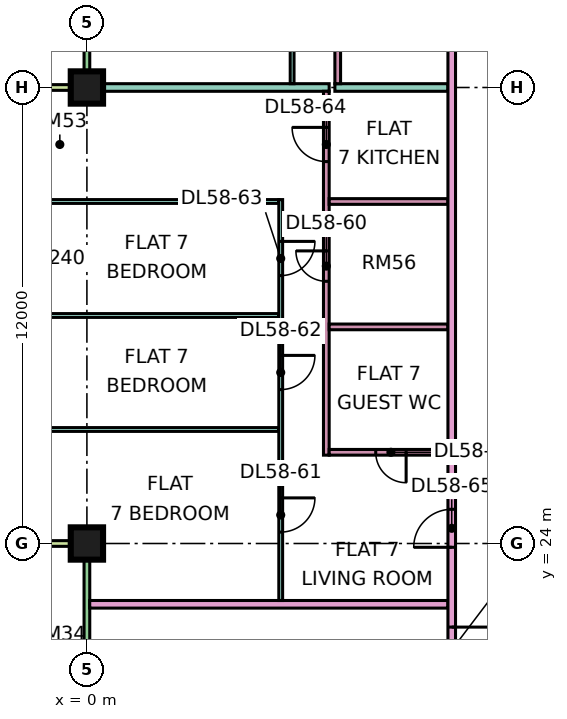
"""IFC4 building model, lengths in metres.
Left out: names, types, materials, properties, quantities, classifications, styles, units other than length and angle.
Written with IfcOpenShell. Run it as: python <this file> out.ifc"""

import sys

from ifc_helpers import new_model, si_unit, direction, frame, frame_2d, origin, origin_2d, place, context, subcontext, project, spatial, rectangle, extrude, element, fill, save


model = new_model("IFC4")
c1 = context("Model", 3, precision=1e-05, world=origin(), true_north=direction((0.0, 1.0)))
c2 = subcontext(c1, "Body", "Model", "MODEL_VIEW")
j1 = project(units=[si_unit("LENGTHUNIT", "METRE"), si_unit("PLANEANGLEUNIT", "RADIAN")], contexts=[c1])
p1 = place(None, origin())
s1 = spatial("IfcSite", under=j1, at=p1, CompositionType="ELEMENT")
p2 = place(p1, origin())
s2 = spatial("IfcBuilding", under=s1, at=p2, CompositionType="ELEMENT")
p3 = place(p2, frame((0.0, 0.0, 245.4)))
s3 = spatial("IfcBuildingStorey", under=s2, at=p3, CompositionType="ELEMENT", Elevation=245.4)
p4 = place(p3, frame((0.0, 24.0, 0.0), z_axis=(0.0, 0.0, 1.0), x_axis=(1.0, 0.0, 0.0)))
e1 = element("IfcColumn", 1, at=p4, inside=s3, PredefinedType="COLUMN", context=c2, shape_type="SweptSolid", body=[
    extrude(rectangle(XDim=0.85, YDim=0.85, at=origin_2d()), origin(), (0.0, 0.0, 1.0), 3.75),
])
p5 = place(p3, frame((0.0, 36.0, 0.0), z_axis=(0.0, 0.0, 1.0), x_axis=(1.0, 0.0, 0.0)))
e2 = element("IfcColumn", 2, at=p5, inside=s3, PredefinedType="COLUMN", context=c2, shape_type="SweptSolid", body=[
    extrude(rectangle(XDim=0.85, YDim=0.85, at=origin_2d()), origin(), (0.0, 0.0, 1.0), 3.75),
])
p6 = place(p3, frame((0.0, 47.925, 0.0), z_axis=(0.0, 0.0, 1.0), x_axis=(0.0, -1.0, 0.0)))
e3 = element("IfcWall", 3, at=p6, inside=s3, PredefinedType="SOLIDWALL", context=c2, shape_type="SweptSolid", body=[
    extrude(rectangle(XDim=11.85, YDim=0.15, at=frame_2d((5.925, 0.0))), origin(), (0.0, 0.0, 1.0), 3.35),
])
p7 = place(p6, frame((0.6, 0.0, 0.45)))
e4 = element("IfcOpeningElement", 4, at=p7, cuts=e3, PredefinedType="OPENING", context=c2, shape_type="SweptSolid", body=[
    extrude(rectangle(XDim=1.2, YDim=2.4, at=frame_2d((0.6, 1.2))), frame((0.0, 0.085, 0.0), z_axis=(0.0, -1.0, 0.0), x_axis=(1.0, 0.0, 0.0)), (0.0, 0.0, 1.0), 0.17),
])
p8 = place(p6, frame((4.087, 0.0, 0.0)))
e5 = element("IfcOpeningElement", 5, at=p8, cuts=e3, PredefinedType="OPENING", context=c2, shape_type="SweptSolid", body=[
    extrude(rectangle(XDim=1.2, YDim=2.4, at=frame_2d((0.6, 1.2))), frame((0.0, 0.085, 0.0), z_axis=(0.0, -1.0, 0.0), x_axis=(1.0, 0.0, 0.0)), (0.0, 0.0, 1.0), 0.17),
])
p9 = place(p6, frame((6.525, 0.0, 0.45)))
e6 = element("IfcOpeningElement", 6, at=p9, cuts=e3, PredefinedType="OPENING", context=c2, shape_type="SweptSolid", body=[
    extrude(rectangle(XDim=1.8, YDim=2.4, at=frame_2d((0.9, 1.2))), frame((0.0, 0.085, 0.0), z_axis=(0.0, -1.0, 0.0), x_axis=(1.0, 0.0, 0.0)), (0.0, 0.0, 1.0), 0.17),
])
p10 = place(p6, frame((9.562, 0.0, 0.45)))
e7 = element("IfcOpeningElement", 7, at=p10, cuts=e3, PredefinedType="OPENING", context=c2, shape_type="SweptSolid", body=[
    extrude(rectangle(XDim=1.2, YDim=2.4, at=frame_2d((0.6, 1.2))), frame((0.0, 0.085, 0.0), z_axis=(0.0, -1.0, 0.0), x_axis=(1.0, 0.0, 0.0)), (0.0, 0.0, 1.0), 0.17),
])
p11 = place(p3, frame((-1.5, 36.0, 0.0), z_axis=(0.0, 0.0, 1.0), x_axis=(1.0, 0.0, 0.0)))
e8 = element("IfcWall", 8, at=p11, inside=s3, PredefinedType="SOLIDWALL", context=c2, shape_type="SweptSolid", body=[
    extrude(rectangle(XDim=1.5, YDim=0.15, at=frame_2d((0.75, 0.0))), origin(), (0.0, 0.0, 1.0), 3.35),
])
p12 = place(p3, frame((0.0, 23.925, 0.0), z_axis=(0.0, 0.0, 1.0), x_axis=(0.0, -1.0, 0.0)))
e9 = element("IfcWall", 9, at=p12, inside=s3, PredefinedType="SOLIDWALL", context=c2, shape_type="SweptSolid", body=[
    extrude(rectangle(XDim=11.35, YDim=0.15, at=frame_2d((5.675, 0.0))), origin(), (0.0, 0.0, 1.0), 3.35),
])
p13 = place(p12, frame((6.738, 0.0, 0.0)))
e10 = element("IfcOpeningElement", 10, at=p13, cuts=e9, PredefinedType="OPENING", context=c2, shape_type="SweptSolid", body=[
    extrude(rectangle(XDim=1.8, YDim=2.4, at=frame_2d((0.9, 1.2))), frame((0.0, 0.085, 0.0), z_axis=(0.0, -1.0, 0.0), x_axis=(1.0, 0.0, 0.0)), (0.0, 0.0, 1.0), 0.17),
])
p14 = place(p3, frame((-1.5, 24.0, 0.0), z_axis=(0.0, 0.0, 1.0), x_axis=(1.0, 0.0, 0.0)))
e11 = element("IfcWall", 11, at=p14, inside=s3, PredefinedType="SOLIDWALL", context=c2, shape_type="SweptSolid", body=[
    extrude(rectangle(XDim=1.5, YDim=0.15, at=frame_2d((0.75, 0.0))), origin(), (0.0, 0.0, 1.0), 3.35),
])
for number, where, z_axis, x_axis in (
    (12, (-1.351, 27.0, 0.0), (0.0, 0.0, 1.0), (1.0, 0.0, 0.0)),
    (13, (-1.351, 30.0, 0.0), (0.0, 0.0, 1.0), (1.0, 0.0, 0.0)),
):
    element("IfcWall", number, at=place(p3, frame(where, z_axis=z_axis, x_axis=x_axis)), inside=s3, PredefinedType="PARTITIONING", context=c2, shape_type="SweptSolid", body=[
        extrude(rectangle(XDim=6.401, YDim=0.1, at=frame_2d((3.201, 0.0))), origin(), (0.0, 0.0, 1.0), 3.35),
    ])
p15 = place(p3, frame((-1.35, 33.0, 0.0), z_axis=(0.0, 0.0, 1.0), x_axis=(1.0, 0.0, 0.0)))
e14 = element("IfcWall", 14, at=p15, inside=s3, PredefinedType="PARTITIONING", context=c2, shape_type="SweptSolid", body=[
    extrude(rectangle(XDim=6.4, YDim=0.1, at=frame_2d((3.2, 0.0))), origin(), (0.0, 0.0, 1.0), 3.35),
])
e15 = element("IfcWall", 15, at=p5, inside=s3, PredefinedType="PARTITIONING", context=c2, shape_type="SweptSolid", body=[
    extrude(rectangle(XDim=6.375, YDim=0.2, at=frame_2d((3.188, 0.0))), origin(), (0.0, 0.0, 1.0), 3.35),
])
p16 = place(p3, frame((0.074, 22.4, 0.0), z_axis=(0.0, 0.0, 1.0), x_axis=(1.0, 0.0, 0.0)))
e16 = element("IfcWall", 16, at=p16, inside=s3, PredefinedType="PARTITIONING", context=c2, shape_type="SweptSolid", body=[
    extrude(rectangle(XDim=9.426, YDim=0.2, at=frame_2d((4.713, 0.0))), origin(), (0.0, 0.0, 1.0), 3.35),
])
p17 = place(p3, frame((5.1, 22.5, 0.0), z_axis=(0.0, 0.0, 1.0), x_axis=(0.0, 1.0, 0.0)))
e17 = element("IfcWall", 17, at=p17, inside=s3, PredefinedType="PARTITIONING", context=c2, shape_type="SweptSolid", body=[
    extrude(rectangle(XDim=10.55, YDim=0.1, at=frame_2d((5.275, 0.0))), origin(), (0.0, 0.0, 1.0), 3.35),
])
p18 = place(p17, frame((1.8, 0.0, 0.0)))
e18 = element("IfcOpeningElement", 18, at=p18, cuts=e17, PredefinedType="OPENING", context=c2, shape_type="SweptSolid", body=[
    extrude(rectangle(XDim=0.9, YDim=2.1, at=frame_2d((0.45, 1.05))), frame((0.0, 0.06, 0.0), z_axis=(0.0, -1.0, 0.0), x_axis=(1.0, 0.0, 0.0)), (0.0, 0.0, 1.0), 0.12),
])
p19 = place(p17, frame((5.55, 0.0, 0.0)))
e19 = element("IfcOpeningElement", 19, at=p19, cuts=e17, PredefinedType="OPENING", context=c2, shape_type="SweptSolid", body=[
    extrude(rectangle(XDim=0.9, YDim=2.1, at=frame_2d((0.45, 1.05))), frame((0.0, 0.06, 0.0), z_axis=(0.0, -1.0, 0.0), x_axis=(1.0, 0.0, 0.0)), (0.0, 0.0, 1.0), 0.12),
])
p20 = place(p17, frame((8.55, 0.0, 0.0)))
e20 = element("IfcOpeningElement", 20, at=p20, cuts=e17, PredefinedType="OPENING", context=c2, shape_type="SweptSolid", body=[
    extrude(rectangle(XDim=0.9, YDim=2.1, at=frame_2d((0.45, 1.05))), frame((0.0, 0.06, 0.0), z_axis=(0.0, -1.0, 0.0), x_axis=(1.0, 0.0, 0.0)), (0.0, 0.0, 1.0), 0.12),
])
p21 = place(p3, frame((5.4, 36.1, 0.0), z_axis=(0.0, 0.0, 1.0), x_axis=(0.0, 1.0, 0.0)))
e21 = element("IfcWall", 21, at=p21, inside=s3, PredefinedType="PARTITIONING", context=c2, shape_type="SweptSolid", body=[
    extrude(rectangle(XDim=26.95, YDim=0.1, at=frame_2d((13.475, 0.0))), origin(), (0.0, 0.0, 1.0), 3.35),
])
p22 = place(p21, frame((0.95, 0.0, 0.0)))
e22 = element("IfcOpeningElement", 22, at=p22, cuts=e21, PredefinedType="OPENING", context=c2, shape_type="SweptSolid", body=[
    extrude(rectangle(XDim=0.9, YDim=2.1, at=frame_2d((0.45, 1.05))), frame((0.0, 0.06, 0.0), z_axis=(0.0, -1.0, 0.0), x_axis=(1.0, 0.0, 0.0)), (0.0, 0.0, 1.0), 0.12),
])
p23 = place(p21, frame((3.95, 0.0, 0.0)))
e23 = element("IfcOpeningElement", 23, at=p23, cuts=e21, PredefinedType="OPENING", context=c2, shape_type="SweptSolid", body=[
    extrude(rectangle(XDim=0.9, YDim=2.1, at=frame_2d((0.45, 1.05))), frame((0.0, 0.06, 0.0), z_axis=(0.0, -1.0, 0.0), x_axis=(1.0, 0.0, 0.0)), (0.0, 0.0, 1.0), 0.12),
])
p24 = place(p21, frame((6.95, 0.0, 0.0)))
e24 = element("IfcOpeningElement", 24, at=p24, cuts=e21, PredefinedType="OPENING", context=c2, shape_type="SweptSolid", body=[
    extrude(rectangle(XDim=0.9, YDim=2.1, at=frame_2d((0.45, 1.05))), frame((0.0, 0.06, 0.0), z_axis=(0.0, -1.0, 0.0), x_axis=(1.0, 0.0, 0.0)), (0.0, 0.0, 1.0), 0.12),
])
p25 = place(p21, frame((9.95, 0.0, 0.0)))
e25 = element("IfcOpeningElement", 25, at=p25, cuts=e21, PredefinedType="OPENING", context=c2, shape_type="SweptSolid", body=[
    extrude(rectangle(XDim=0.9, YDim=2.1, at=frame_2d((0.45, 1.05))), frame((0.0, 0.06, 0.0), z_axis=(0.0, -1.0, 0.0), x_axis=(1.0, 0.0, 0.0)), (0.0, 0.0, 1.0), 0.12),
])
p26 = place(p21, frame((21.95, 0.0, 0.0)))
e26 = element("IfcOpeningElement", 26, at=p26, cuts=e21, PredefinedType="OPENING", context=c2, shape_type="SweptSolid", body=[
    extrude(rectangle(XDim=0.9, YDim=2.1, at=frame_2d((0.45, 1.05))), frame((0.0, 0.06, 0.0), z_axis=(0.0, -1.0, 0.0), x_axis=(1.0, 0.0, 0.0)), (0.0, 0.0, 1.0), 0.12),
])
p27 = place(p21, frame((24.95, 0.0, 0.0)))
e27 = element("IfcOpeningElement", 27, at=p27, cuts=e21, PredefinedType="OPENING", context=c2, shape_type="SweptSolid", body=[
    extrude(rectangle(XDim=0.9, YDim=2.1, at=frame_2d((0.45, 1.05))), frame((0.0, 0.06, 0.0), z_axis=(0.0, -1.0, 0.0), x_axis=(1.0, 0.0, 0.0)), (0.0, 0.0, 1.0), 0.12),
])
p28 = place(p21, frame((15.95, 0.0, 0.0)))
e28 = element("IfcOpeningElement", 28, at=p28, cuts=e21, PredefinedType="OPENING", context=c2, shape_type="SweptSolid", body=[
    extrude(rectangle(XDim=0.9, YDim=2.1, at=frame_2d((0.45, 1.05))), frame((0.0, 0.06, 0.0), z_axis=(0.0, -1.0, 0.0), x_axis=(1.0, 0.0, 0.0)), (0.0, 0.0, 1.0), 0.12),
])
p29 = place(p3, frame((6.3, 26.325, 0.0), z_axis=(0.0, 0.0, 1.0), x_axis=(0.0, 1.0, 0.0)))
e29 = element("IfcWall", 29, at=p29, inside=s3, PredefinedType="PARTITIONING", context=c2, shape_type="SweptSolid", body=[
    extrude(rectangle(XDim=9.575, YDim=0.15, at=frame_2d((4.788, 0.0))), origin(), (0.0, 0.0, 1.0), 3.35),
])
p30 = place(p29, frame((4.575, 0.0, 0.0)))
e30 = element("IfcOpeningElement", 30, at=p30, cuts=e29, PredefinedType="OPENING", context=c2, shape_type="SweptSolid", body=[
    extrude(rectangle(XDim=0.8, YDim=2.1, at=frame_2d((0.4, 1.05))), frame((0.0, 0.085, 0.0), z_axis=(0.0, -1.0, 0.0), x_axis=(1.0, 0.0, 0.0)), (0.0, 0.0, 1.0), 0.17),
])
p31 = place(p29, frame((7.725, 0.0, 0.0)))
e31 = element("IfcOpeningElement", 31, at=p31, cuts=e29, PredefinedType="OPENING", context=c2, shape_type="SweptSolid", body=[
    extrude(rectangle(XDim=0.9, YDim=2.1, at=frame_2d((0.45, 1.05))), frame((0.0, 0.085, 0.0), z_axis=(0.0, -1.0, 0.0), x_axis=(1.0, 0.0, 0.0)), (0.0, 0.0, 1.0), 0.17),
])
p32 = place(p3, frame((6.375, 26.4, 0.0), z_axis=(0.0, 0.0, 1.0), x_axis=(1.0, 0.0, 0.0)))
e32 = element("IfcWall", 32, at=p32, inside=s3, PredefinedType="PARTITIONING", context=c2, shape_type="SweptSolid", body=[
    extrude(rectangle(XDim=3.125, YDim=0.15, at=frame_2d((1.562, 0.0))), origin(), (0.0, 0.0, 1.0), 3.35),
])
p33 = place(p32, frame((1.225, 0.0, 0.0)))
e33 = element("IfcOpeningElement", 33, at=p33, cuts=e32, PredefinedType="OPENING", context=c2, shape_type="SweptSolid", body=[
    extrude(rectangle(XDim=0.8, YDim=2.1, at=frame_2d((0.4, 1.05))), frame((0.0, 0.085, 0.0), z_axis=(0.0, -1.0, 0.0), x_axis=(1.0, 0.0, 0.0)), (0.0, 0.0, 1.0), 0.17),
])
for number, where, z_axis, x_axis in (
    (34, (6.375, 29.7, 0.0), (0.0, 0.0, 1.0), (1.0, 0.0, 0.0)),
    (35, (6.375, 33.0, 0.0), (0.0, 0.0, 1.0), (1.0, 0.0, 0.0)),
):
    element("IfcWall", number, at=place(p3, frame(where, z_axis=z_axis, x_axis=x_axis)), inside=s3, PredefinedType="PARTITIONING", context=c2, shape_type="SweptSolid", body=[
        extrude(rectangle(XDim=3.125, YDim=0.15, at=frame_2d((1.562, 0.0))), origin(), (0.0, 0.0, 1.0), 3.35),
    ])
p34 = place(p3, frame((6.525, 36.0, 0.0), z_axis=(0.0, 0.0, 1.0), x_axis=(1.0, 0.0, 0.0)))
e36 = element("IfcWall", 36, at=p34, inside=s3, PredefinedType="PARTITIONING", context=c2, shape_type="SweptSolid", body=[
    extrude(rectangle(XDim=2.975, YDim=0.2, at=frame_2d((1.488, 0.0))), origin(), (0.0, 0.0, 1.0), 3.35),
])
p35 = place(p3, frame((6.6, 36.1, 0.0), z_axis=(0.0, 0.0, 1.0), x_axis=(0.0, 1.0, 0.0)))
e37 = element("IfcWall", 37, at=p35, inside=s3, PredefinedType="PARTITIONING", context=c2, shape_type="SweptSolid", body=[
    extrude(rectangle(XDim=12.275, YDim=0.15, at=frame_2d((6.137, 0.0))), origin(), (0.0, 0.0, 1.0), 3.35),
])
p36 = place(p35, frame((6.95, 0.0, 0.0)))
e38 = element("IfcOpeningElement", 38, at=p36, cuts=e37, PredefinedType="OPENING", context=c2, shape_type="SweptSolid", body=[
    extrude(rectangle(XDim=0.8, YDim=2.1, at=frame_2d((0.4, 1.05))), frame((0.0, 0.085, 0.0), z_axis=(0.0, -1.0, 0.0), x_axis=(1.0, 0.0, 0.0)), (0.0, 0.0, 1.0), 0.17),
])
p37 = place(p35, frame((2.75, 0.0, 0.0)))
e39 = element("IfcOpeningElement", 39, at=p37, cuts=e37, PredefinedType="OPENING", context=c2, shape_type="SweptSolid", body=[
    extrude(rectangle(XDim=0.9, YDim=2.1, at=frame_2d((0.45, 1.05))), frame((0.0, 0.085, 0.0), z_axis=(0.0, -1.0, 0.0), x_axis=(1.0, 0.0, 0.0)), (0.0, 0.0, 1.0), 0.17),
])
p38 = place(p35, frame((9.8, 0.0, 0.0)))
e40 = element("IfcOpeningElement", 40, at=p38, cuts=e37, PredefinedType="OPENING", context=c2, shape_type="SweptSolid", body=[
    extrude(rectangle(XDim=0.8, YDim=2.1, at=frame_2d((0.4, 1.05))), frame((0.0, 0.085, 0.0), z_axis=(0.0, -1.0, 0.0), x_axis=(1.0, 0.0, 0.0)), (0.0, 0.0, 1.0), 0.17),
])
p39 = place(p3, frame((9.6, 20.0, 0.0), z_axis=(0.0, 0.0, 1.0), x_axis=(0.0, 1.0, 0.0)))
e41 = element("IfcWall", 41, at=p39, inside=s3, PredefinedType="PARTITIONING", context=c2, shape_type="SweptSolid", body=[
    extrude(rectangle(XDim=44.35, YDim=0.2, at=frame_2d((22.175, 0.0))), origin(), (0.0, 0.0, 1.0), 3.35),
])
p40 = place(p39, frame((28.8, 0.0, 0.0)))
e42 = element("IfcOpeningElement", 42, at=p40, cuts=e41, PredefinedType="OPENING", context=c2, shape_type="SweptSolid", body=[
    extrude(rectangle(XDim=1.0, YDim=2.1, at=frame_2d((0.5, 1.05))), frame((0.0, 0.11, 0.0), z_axis=(0.0, -1.0, 0.0), x_axis=(1.0, 0.0, 0.0)), (0.0, 0.0, 1.0), 0.22),
])
p41 = place(p39, frame((0.6, 0.0, 0.0)))
e43 = element("IfcOpeningElement", 43, at=p41, cuts=e41, PredefinedType="OPENING", context=c2, shape_type="SweptSolid", body=[
    extrude(rectangle(XDim=1.2, YDim=2.1, at=frame_2d((0.6, 1.05))), frame((0.0, 0.11, 0.0), z_axis=(0.0, -1.0, 0.0), x_axis=(1.0, 0.0, 0.0)), (0.0, 0.0, 1.0), 0.22),
])
p42 = place(p39, frame((3.9, 0.0, 0.0)))
e44 = element("IfcOpeningElement", 44, at=p42, cuts=e41, PredefinedType="OPENING", context=c2, shape_type="SweptSolid", body=[
    extrude(rectangle(XDim=1.0, YDim=2.1, at=frame_2d((0.5, 1.05))), frame((0.0, 0.11, 0.0), z_axis=(0.0, -1.0, 0.0), x_axis=(1.0, 0.0, 0.0)), (0.0, 0.0, 1.0), 0.22),
])
p43 = place(p41, origin())
e45 = element("IfcDoor", 45, at=p43, inside=s3, OperationType="SINGLE_SWING_RIGHT", PredefinedType="DOOR", context=c2, shape_type="SweptSolid", body=[
    extrude(rectangle(XDim=1.2, YDim=2.1, at=frame_2d((0.6, 1.05))), frame((0.0, 0.025, 0.0), z_axis=(0.0, -1.0, 0.0), x_axis=(1.0, 0.0, 0.0)), (0.0, 0.0, 1.0), 0.05),
])
fill(e43, e45)
p44 = place(p30, frame((0.8, 0.0, 0.0), z_axis=(0.0, 0.0, 1.0), x_axis=(-1.0, 0.0, 0.0)))
e46 = element("IfcDoor", 46, at=p44, inside=s3, OperationType="SINGLE_SWING_RIGHT", PredefinedType="DOOR", context=c2, shape_type="SweptSolid", body=[
    extrude(rectangle(XDim=0.8, YDim=2.1, at=frame_2d((0.4, 1.05))), frame((0.0, 0.025, 0.0), z_axis=(0.0, -1.0, 0.0), x_axis=(1.0, 0.0, 0.0)), (0.0, 0.0, 1.0), 0.05),
])
fill(e30, e46)
p45 = place(p18, origin())
e47 = element("IfcDoor", 47, at=p45, inside=s3, OperationType="SINGLE_SWING_RIGHT", PredefinedType="DOOR", context=c2, shape_type="SweptSolid", body=[
    extrude(rectangle(XDim=0.9, YDim=2.1, at=frame_2d((0.45, 1.05))), frame((0.0, 0.025, 0.0), z_axis=(0.0, -1.0, 0.0), x_axis=(1.0, 0.0, 0.0)), (0.0, 0.0, 1.0), 0.05),
])
fill(e18, e47)
p46 = place(p19, origin())
e48 = element("IfcDoor", 48, at=p46, inside=s3, OperationType="SINGLE_SWING_RIGHT", PredefinedType="DOOR", context=c2, shape_type="SweptSolid", body=[
    extrude(rectangle(XDim=0.9, YDim=2.1, at=frame_2d((0.45, 1.05))), frame((0.0, 0.025, 0.0), z_axis=(0.0, -1.0, 0.0), x_axis=(1.0, 0.0, 0.0)), (0.0, 0.0, 1.0), 0.05),
])
fill(e19, e48)
p47 = place(p20, origin())
e49 = element("IfcDoor", 49, at=p47, inside=s3, OperationType="SINGLE_SWING_RIGHT", PredefinedType="DOOR", context=c2, shape_type="SweptSolid", body=[
    extrude(rectangle(XDim=0.9, YDim=2.1, at=frame_2d((0.45, 1.05))), frame((0.0, 0.025, 0.0), z_axis=(0.0, -1.0, 0.0), x_axis=(1.0, 0.0, 0.0)), (0.0, 0.0, 1.0), 0.05),
])
fill(e20, e49)
p48 = place(p31, frame((0.9, 0.0, 0.0), z_axis=(0.0, 0.0, 1.0), x_axis=(-1.0, 0.0, 0.0)))
e50 = element("IfcDoor", 50, at=p48, inside=s3, OperationType="SINGLE_SWING_RIGHT", PredefinedType="DOOR", context=c2, shape_type="SweptSolid", body=[
    extrude(rectangle(XDim=0.9, YDim=2.1, at=frame_2d((0.45, 1.05))), frame((0.0, 0.025, 0.0), z_axis=(0.0, -1.0, 0.0), x_axis=(1.0, 0.0, 0.0)), (0.0, 0.0, 1.0), 0.05),
])
fill(e31, e50)
p49 = place(p42, origin())
e51 = element("IfcDoor", 51, at=p49, inside=s3, OperationType="SINGLE_SWING_LEFT", PredefinedType="DOOR", context=c2, shape_type="SweptSolid", body=[
    extrude(rectangle(XDim=1.0, YDim=2.1, at=frame_2d((0.5, 1.05))), frame((0.0, 0.025, 0.0), z_axis=(0.0, -1.0, 0.0), x_axis=(1.0, 0.0, 0.0)), (0.0, 0.0, 1.0), 0.05),
])
fill(e44, e51)
p50 = place(p33, origin())
e52 = element("IfcDoor", 52, at=p50, inside=s3, OperationType="SINGLE_SWING_RIGHT", PredefinedType="DOOR", context=c2, shape_type="SweptSolid", body=[
    extrude(rectangle(XDim=0.8, YDim=2.1, at=frame_2d((0.4, 1.05))), frame((0.0, 0.025, 0.0), z_axis=(0.0, -1.0, 0.0), x_axis=(1.0, 0.0, 0.0)), (0.0, 0.0, 1.0), 0.05),
])
fill(e33, e52)
save(model, sys.argv[1])
